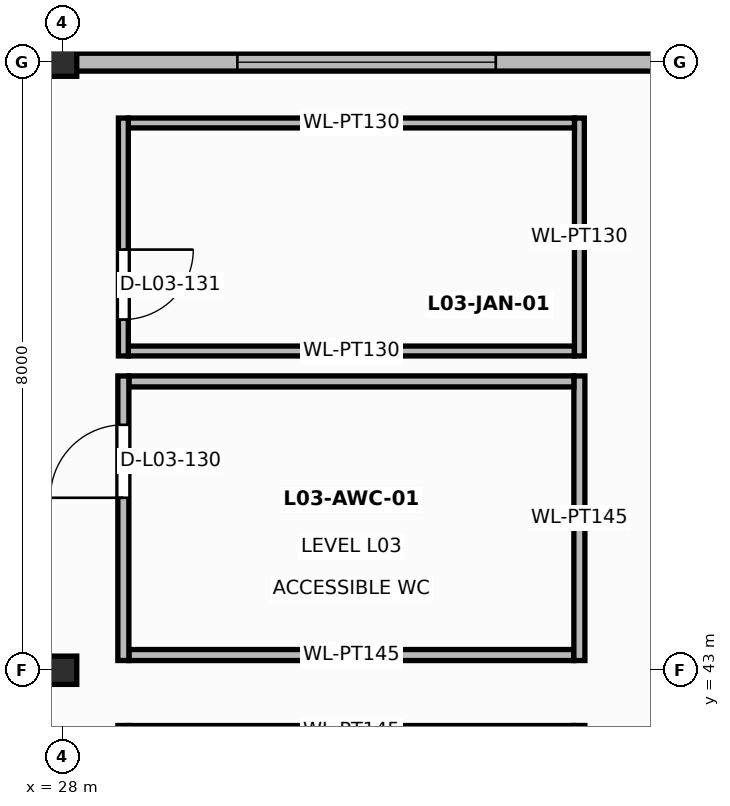
"""IFC4 building model, lengths in metres.
Left out: names, types, materials, properties, quantities, classifications, styles, units other than length and angle.
Written with IfcOpenShell. Run it as: python <this file> out.ifc"""

import sys

from ifc_helpers import new_model, si_unit, direction, frame, frame_2d, origin, origin_2d, place, context, subcontext, project, spatial, rectangle, i_section, extrude, element, fill, save


model = new_model("IFC4")
c1 = context("Model", 3, precision=1e-05, world=origin(), true_north=direction((0.0, 1.0)))
c2 = subcontext(c1, "Body", "Model", "MODEL_VIEW")
j1 = project(units=[si_unit("LENGTHUNIT", "METRE"), si_unit("PLANEANGLEUNIT", "RADIAN")], contexts=[c1])
p1 = place(None, origin())
s1 = spatial("IfcSite", under=j1, at=p1, CompositionType="ELEMENT")
p2 = place(p1, origin())
s2 = spatial("IfcBuilding", under=s1, at=p2, CompositionType="ELEMENT")
p3 = place(p2, frame((0.0, 0.0, 15.6)))
s3 = spatial("IfcBuildingStorey", under=s2, at=p3, CompositionType="ELEMENT", Elevation=15.6)
p4 = place(p3, frame((28.0, 43.0, 0.0), z_axis=(0.0, 0.0, 1.0), x_axis=(1.0, 0.0, 0.0)))
e1 = element("IfcColumn", 1, at=p4, inside=s3, PredefinedType="COLUMN", context=c2, shape_type="SweptSolid", body=[
    extrude(i_section(OverallWidth=0.374, OverallDepth=0.372, WebThickness=0.016, FlangeThickness=0.026, at=origin_2d()), origin(), (0.0, 0.0, 1.0), 5.62),
])
p5 = place(p3, frame((28.0, 51.0, 0.0), z_axis=(0.0, 0.0, 1.0), x_axis=(1.0, 0.0, 0.0)))
e2 = element("IfcColumn", 2, at=p5, inside=s3, PredefinedType="COLUMN", context=c2, shape_type="SweptSolid", body=[
    extrude(i_section(OverallWidth=0.374, OverallDepth=0.372, WebThickness=0.016, FlangeThickness=0.026, at=origin_2d()), origin(), (0.0, 0.0, 1.0), 3.85),
])
p6 = place(p3, frame((20.01, 51.0, 0.0), z_axis=(0.0, 0.0, 1.0), x_axis=(1.0, 0.0, 0.0)))
e3 = element("IfcWall", 3, at=p6, inside=s3, PredefinedType="SOLIDWALL", context=c2, shape_type="SweptSolid", body=[
    extrude(rectangle(XDim=7.98, YDim=0.235, at=frame_2d((3.99, 0.0))), origin(), (0.0, 0.0, 1.0), 3.35),
])
p7 = place(p6, frame((3.165, 0.0, 0.85)))
e4 = element("IfcOpeningElement", 4, at=p7, cuts=e3, PredefinedType="OPENING", context=c2, shape_type="SweptSolid", body=[
    extrude(rectangle(XDim=1.65, YDim=1.3, at=frame_2d((0.825, 0.65))), frame((0.0, 0.127, 0.0), z_axis=(0.0, -1.0, 0.0), x_axis=(1.0, 0.0, 0.0)), (0.0, 0.0, 1.0), 0.255),
])
p8 = place(p3, frame((28.01, 51.0, 0.0), z_axis=(0.0, 0.0, 1.0), x_axis=(1.0, 0.0, 0.0)))
e5 = element("IfcWall", 5, at=p8, inside=s3, PredefinedType="SOLIDWALL", context=c2, shape_type="SweptSolid", body=[
    extrude(rectangle(XDim=7.98, YDim=0.235, at=frame_2d((3.99, 0.0))), origin(), (0.0, 0.0, 1.0), 3.35),
])
p9 = place(p8, frame((2.29, 0.0, 0.85)))
e6 = element("IfcOpeningElement", 6, at=p9, cuts=e5, PredefinedType="OPENING", context=c2, shape_type="SweptSolid", body=[
    extrude(rectangle(XDim=3.4, YDim=1.55, at=frame_2d((1.7, 0.775))), frame((0.0, 0.127, 0.0), z_axis=(0.0, -1.0, 0.0), x_axis=(1.0, 0.0, 0.0)), (0.0, 0.0, 1.0), 0.255),
])
p10 = place(p3, frame((28.873, 43.2, 0.0), z_axis=(0.0, 0.0, 1.0), x_axis=(1.0, 0.0, 0.0)))
e7 = element("IfcWall", 7, at=p10, inside=s3, PredefinedType="PARTITIONING", context=c2, shape_type="SweptSolid", body=[
    extrude(rectangle(XDim=5.854, YDim=0.145, at=frame_2d((2.927, 0.0))), origin(), (0.0, 0.0, 1.0), 3.9),
])
p11 = place(p3, frame((34.8, 43.128, 0.0), z_axis=(0.0, 0.0, 1.0), x_axis=(0.0, 1.0, 0.0)))
e8 = element("IfcWall", 8, at=p11, inside=s3, PredefinedType="PARTITIONING", context=c2, shape_type="SweptSolid", body=[
    extrude(rectangle(XDim=3.744, YDim=0.145, at=frame_2d((1.872, 0.0))), origin(), (0.0, 0.0, 1.0), 3.9),
])
p12 = place(p3, frame((34.727, 46.8, 0.0), z_axis=(0.0, 0.0, 1.0), x_axis=(-1.0, 0.0, 0.0)))
e9 = element("IfcWall", 9, at=p12, inside=s3, PredefinedType="PARTITIONING", context=c2, shape_type="SweptSolid", body=[
    extrude(rectangle(XDim=5.854, YDim=0.145, at=frame_2d((2.927, 0.0))), origin(), (0.0, 0.0, 1.0), 3.9),
])
p13 = place(p3, frame((28.8, 46.872, 0.0), z_axis=(0.0, 0.0, 1.0), x_axis=(0.0, -1.0, 0.0)))
e10 = element("IfcWall", 10, at=p13, inside=s3, PredefinedType="PARTITIONING", context=c2, shape_type="SweptSolid", body=[
    extrude(rectangle(XDim=3.744, YDim=0.145, at=frame_2d((1.872, 0.0))), origin(), (0.0, 0.0, 1.0), 3.9),
])
p14 = place(p13, frame((0.643, 0.0, 0.0)))
e11 = element("IfcOpeningElement", 11, at=p14, cuts=e10, PredefinedType="OPENING", context=c2, shape_type="SweptSolid", body=[
    extrude(rectangle(XDim=0.96, YDim=2.12, at=frame_2d((0.48, 1.06))), frame((0.0, 0.083, 0.0), z_axis=(0.0, -1.0, 0.0), x_axis=(1.0, 0.0, 0.0)), (0.0, 0.0, 1.0), 0.165),
])
p15 = place(p3, frame((28.865, 47.2, 0.0), z_axis=(0.0, 0.0, 1.0), x_axis=(1.0, 0.0, 0.0)))
e12 = element("IfcWall", 12, at=p15, inside=s3, PredefinedType="PARTITIONING", context=c2, shape_type="SweptSolid", body=[
    extrude(rectangle(XDim=5.87, YDim=0.13, at=frame_2d((2.935, 0.0))), origin(), (0.0, 0.0, 1.0), 3.9),
])
p16 = place(p3, frame((34.8, 47.135, 0.0), z_axis=(0.0, 0.0, 1.0), x_axis=(0.0, 1.0, 0.0)))
e13 = element("IfcWall", 13, at=p16, inside=s3, PredefinedType="PARTITIONING", context=c2, shape_type="SweptSolid", body=[
    extrude(rectangle(XDim=3.13, YDim=0.13, at=frame_2d((1.565, 0.0))), origin(), (0.0, 0.0, 1.0), 3.9),
])
p17 = place(p3, frame((34.735, 50.2, 0.0), z_axis=(0.0, 0.0, 1.0), x_axis=(-1.0, 0.0, 0.0)))
e14 = element("IfcWall", 14, at=p17, inside=s3, PredefinedType="PARTITIONING", context=c2, shape_type="SweptSolid", body=[
    extrude(rectangle(XDim=5.87, YDim=0.13, at=frame_2d((2.935, 0.0))), origin(), (0.0, 0.0, 1.0), 3.9),
])
p18 = place(p3, frame((28.8, 50.265, 0.0), z_axis=(0.0, 0.0, 1.0), x_axis=(0.0, -1.0, 0.0)))
e15 = element("IfcWall", 15, at=p18, inside=s3, PredefinedType="PARTITIONING", context=c2, shape_type="SweptSolid", body=[
    extrude(rectangle(XDim=3.13, YDim=0.13, at=frame_2d((1.565, 0.0))), origin(), (0.0, 0.0, 1.0), 3.9),
])
p19 = place(p18, frame((1.731, 0.0, 0.0)))
e16 = element("IfcOpeningElement", 16, at=p19, cuts=e15, PredefinedType="OPENING", context=c2, shape_type="SweptSolid", body=[
    extrude(rectangle(XDim=0.92, YDim=2.1, at=frame_2d((0.46, 1.05))), frame((0.0, 0.075, 0.0), z_axis=(0.0, -1.0, 0.0), x_axis=(1.0, 0.0, 0.0)), (0.0, 0.0, 1.0), 0.15),
])
p20 = place(p9, origin())
e17 = element("IfcWindow", 17, at=p20, inside=s3, PartitioningType="SINGLE_PANEL", PredefinedType="WINDOW", context=c2, shape_type="SweptSolid", body=[
    extrude(rectangle(XDim=3.4, YDim=1.55, at=frame_2d((1.7, 0.775))), frame((0.0, 0.03, 0.0), z_axis=(0.0, -1.0, 0.0), x_axis=(1.0, 0.0, 0.0)), (0.0, 0.0, 1.0), 0.06),
])
fill(e6, e17)
p21 = place(p14, frame((0.96, 0.0, 0.0), z_axis=(0.0, 0.0, 1.0), x_axis=(-1.0, 0.0, 0.0)))
e18 = element("IfcDoor", 18, at=p21, inside=s3, OperationType="SINGLE_SWING_RIGHT", PredefinedType="DOOR", context=c2, shape_type="SweptSolid", body=[
    extrude(rectangle(XDim=0.96, YDim=2.12, at=frame_2d((0.48, 1.06))), frame((0.0, 0.025, 0.0), z_axis=(0.0, -1.0, 0.0), x_axis=(1.0, 0.0, 0.0)), (0.0, 0.0, 1.0), 0.05),
])
fill(e11, e18)
p22 = place(p19, origin())
e19 = element("IfcDoor", 19, at=p22, inside=s3, OperationType="SINGLE_SWING_LEFT", PredefinedType="DOOR", context=c2, shape_type="SweptSolid", body=[
    extrude(rectangle(XDim=0.92, YDim=2.1, at=frame_2d((0.46, 1.05))), frame((0.0, 0.025, 0.0), z_axis=(0.0, -1.0, 0.0), x_axis=(1.0, 0.0, 0.0)), (0.0, 0.0, 1.0), 0.05),
])
fill(e16, e19)
save(model, sys.argv[1])
